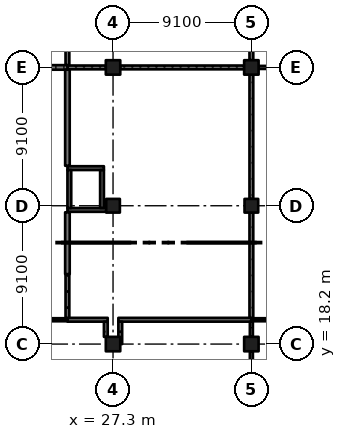
"""IFC4 building model, lengths in metres.
Left out: names, types, materials, properties, quantities, classifications, styles, units other than length and angle.
Written with IfcOpenShell. Run it as: python <this file> out.ifc"""

import sys

from ifc_helpers import new_model, si_unit, direction, frame, frame_2d, origin, origin_2d, place, context, subcontext, project, spatial, rectangle, extrude, element, fill, save


model = new_model("IFC4")
c1 = context("Model", 3, precision=1e-05, world=origin(), true_north=direction((0.0, 1.0)))
c2 = subcontext(c1, "Body", "Model", "MODEL_VIEW")
j1 = project(units=[si_unit("LENGTHUNIT", "METRE"), si_unit("PLANEANGLEUNIT", "RADIAN")], contexts=[c1])
p1 = place(None, origin())
s1 = spatial("IfcSite", under=j1, at=p1, CompositionType="ELEMENT")
p2 = place(p1, origin())
s2 = spatial("IfcBuilding", under=s1, at=p2, CompositionType="ELEMENT")
p3 = place(p2, origin())
s3 = spatial("IfcBuildingStorey", under=s2, at=p3, CompositionType="ELEMENT", Elevation=0.0)
p4 = place(p3, frame((27.3, 18.2, -0.4), z_axis=(0.0, 0.0, 1.0), x_axis=(1.0, 0.0, 0.0)))
e1 = element("IfcColumn", 1, at=p4, inside=s3, PredefinedType="COLUMN", context=c2, shape_type="SweptSolid", body=[
    extrude(rectangle(XDim=0.95, YDim=0.95, at=origin_2d()), origin(), (0.0, 0.0, 1.0), 6.77),
])
p5 = place(p3, frame((27.3, 27.3, -0.4), z_axis=(0.0, 0.0, 1.0), x_axis=(1.0, 0.0, 0.0)))
e2 = element("IfcColumn", 2, at=p5, inside=s3, PredefinedType="COLUMN", context=c2, shape_type="SweptSolid", body=[
    extrude(rectangle(XDim=0.9, YDim=0.9, at=origin_2d()), origin(), (0.0, 0.0, 1.0), 6.77),
])
for number, where, z_axis, x_axis in (
    (3, (27.3, 36.4, -0.4), (0.0, 0.0, 1.0), (1.0, 0.0, 0.0)),
    (4, (36.4, 18.2, -0.4), (0.0, 0.0, 1.0), (1.0, 0.0, 0.0)),
):
    element("IfcColumn", number, at=place(p3, frame(where, z_axis=z_axis, x_axis=x_axis)), inside=s3, PredefinedType="COLUMN", context=c2, shape_type="SweptSolid", body=[
        extrude(rectangle(XDim=0.95, YDim=0.95, at=origin_2d()), origin(), (0.0, 0.0, 1.0), 6.77),
    ])
p6 = place(p3, frame((36.4, 27.3, -0.4), z_axis=(0.0, 0.0, 1.0), x_axis=(1.0, 0.0, 0.0)))
e5 = element("IfcColumn", 5, at=p6, inside=s3, PredefinedType="COLUMN", context=c2, shape_type="SweptSolid", body=[
    extrude(rectangle(XDim=0.9, YDim=0.9, at=origin_2d()), origin(), (0.0, 0.0, 1.0), 6.77),
])
p7 = place(p3, frame((36.4, 36.4, -0.4), z_axis=(0.0, 0.0, 1.0), x_axis=(1.0, 0.0, 0.0)))
e6 = element("IfcColumn", 6, at=p7, inside=s3, PredefinedType="COLUMN", context=c2, shape_type="SweptSolid", body=[
    extrude(rectangle(XDim=0.95, YDim=0.95, at=origin_2d()), origin(), (0.0, 0.0, 1.0), 6.77),
])
p8 = place(p3, frame((26.85, 27.025, -0.4), z_axis=(0.0, 0.0, 1.0), x_axis=(-1.0, 0.0, 0.0)))
e7 = element("IfcWall", 7, at=p8, inside=s3, PredefinedType="SHEAR", context=c2, shape_type="SweptSolid", body=[
    extrude(rectangle(XDim=2.55, YDim=0.25, at=frame_2d((1.275, 0.0))), origin(), (0.0, 0.0, 1.0), 6.77),
])
p9 = place(p3, frame((26.7, 29.775, -0.4), z_axis=(0.0, 0.0, 1.0), x_axis=(-1.0, 0.0, 0.0)))
e8 = element("IfcWall", 8, at=p9, inside=s3, PredefinedType="SHEAR", context=c2, shape_type="SweptSolid", body=[
    extrude(rectangle(XDim=2.4, YDim=0.25, at=frame_2d((1.2, 0.0))), origin(), (0.0, 0.0, 1.0), 6.77),
])
p10 = place(p3, frame((24.425, 29.65, -0.4), z_axis=(0.0, 0.0, 1.0), x_axis=(0.0, -1.0, 0.0)))
e9 = element("IfcWall", 9, at=p10, inside=s3, PredefinedType="SHEAR", context=c2, shape_type="SweptSolid", body=[
    extrude(rectangle(XDim=2.5, YDim=0.25, at=frame_2d((1.25, 0.0))), origin(), (0.0, 0.0, 1.0), 6.77),
])
p11 = place(p10, frame((0.9, 0.0, 0.4)))
e10 = element("IfcOpeningElement", 10, at=p11, cuts=e9, PredefinedType="OPENING", context=c2, shape_type="SweptSolid", body=[
    extrude(rectangle(XDim=0.7, YDim=2.1, at=frame_2d((0.35, 1.05))), frame((0.0, 0.135, 0.0), z_axis=(0.0, -1.0, 0.0), x_axis=(1.0, 0.0, 0.0)), (0.0, 0.0, 1.0), 0.27),
])
p12 = place(p3, frame((26.575, 29.65, -0.4), z_axis=(0.0, 0.0, 1.0), x_axis=(0.0, -1.0, 0.0)))
e11 = element("IfcWall", 11, at=p12, inside=s3, PredefinedType="SHEAR", context=c2, shape_type="SweptSolid", body=[
    extrude(rectangle(XDim=2.5, YDim=0.25, at=frame_2d((1.25, 0.0))), origin(), (0.0, 0.0, 1.0), 6.77),
])
p13 = place(p3, frame((18.1, 19.8, 0.0), z_axis=(0.0, 0.0, 1.0), x_axis=(1.0, 0.0, 0.0)))
e12 = element("IfcWall", 12, at=p13, inside=s3, PredefinedType="PARTITIONING", context=c2, shape_type="SweptSolid", body=[
    extrude(rectangle(XDim=6.2, YDim=0.2, at=frame_2d((3.1, 0.0))), origin(), (0.0, 0.0, 1.0), 6.02),
])
p14 = place(p13, frame((2.95, 0.0, 0.0)))
e13 = element("IfcOpeningElement", 13, at=p14, cuts=e12, PredefinedType="OPENING", context=c2, shape_type="SweptSolid", body=[
    extrude(rectangle(XDim=1.8, YDim=2.4, at=frame_2d((0.9, 1.2))), frame((0.0, 0.11, 0.0), z_axis=(0.0, -1.0, 0.0), x_axis=(1.0, 0.0, 0.0)), (0.0, 0.0, 1.0), 0.22),
])
p15 = place(p3, frame((18.675, 36.4, 0.0), z_axis=(0.0, 0.0, 1.0), x_axis=(1.0, 0.0, 0.0)))
e14 = element("IfcWall", 14, at=p15, inside=s3, PredefinedType="SOLIDWALL", context=c2, shape_type="SweptSolid", body=[
    extrude(rectangle(XDim=5.625, YDim=0.3, at=frame_2d((2.812, 0.0))), origin(), (0.0, 0.0, 1.0), 5.32),
])
p16 = place(p15, frame((2.35, 0.0, 0.0)))
e15 = element("IfcOpeningElement", 15, at=p16, cuts=e14, PredefinedType="OPENING", context=c2, shape_type="SweptSolid", body=[
    extrude(rectangle(XDim=1.0, YDim=2.1, at=frame_2d((0.5, 1.05))), frame((0.0, 0.16, 0.0), z_axis=(0.0, -1.0, 0.0), x_axis=(1.0, 0.0, 0.0)), (0.0, 0.0, 1.0), 0.32),
])
p17 = place(p3, frame((24.3, 19.8, 0.0), z_axis=(0.0, 0.0, 1.0), x_axis=(1.0, 0.0, 0.0)))
e16 = element("IfcWall", 16, at=p17, inside=s3, PredefinedType="SOLIDWALL", context=c2, shape_type="SweptSolid", body=[
    extrude(rectangle(XDim=2.65, YDim=0.25, at=frame_2d((1.325, 0.0))), origin(), (0.0, 0.0, 1.0), 6.02),
])
p18 = place(p3, frame((24.3, 22.8, 0.0), z_axis=(0.0, 0.0, 1.0), x_axis=(0.0, -1.0, 0.0)))
e17 = element("IfcWall", 17, at=p18, inside=s3, PredefinedType="SOLIDWALL", context=c2, shape_type="SweptSolid", body=[
    extrude(rectangle(XDim=2.875, YDim=0.25, at=frame_2d((1.438, 0.0))), origin(), (0.0, 0.0, 1.0), 6.02),
])
p19 = place(p3, frame((24.3, 26.87, 0.0), z_axis=(0.0, 0.0, 1.0), x_axis=(0.0, -1.0, 0.0)))
e18 = element("IfcWall", 18, at=p19, inside=s3, PredefinedType="SOLIDWALL", context=c2, shape_type="SweptSolid", body=[
    extrude(rectangle(XDim=4.07, YDim=0.3, at=frame_2d((2.035, 0.0))), origin(), (0.0, 0.0, 1.0), 6.02),
])
p20 = place(p3, frame((24.3, 36.25, 0.0), z_axis=(0.0, 0.0, 1.0), x_axis=(0.0, -1.0, 0.0)))
e19 = element("IfcWall", 19, at=p20, inside=s3, PredefinedType="SOLIDWALL", context=c2, shape_type="SweptSolid", body=[
    extrude(rectangle(XDim=6.32, YDim=0.3, at=frame_2d((3.16, 0.0))), origin(), (0.0, 0.0, 1.0), 6.02),
])
p21 = place(p3, frame((24.3, 36.4, 0.0), z_axis=(0.0, 0.0, 1.0), x_axis=(1.0, 0.0, 0.0)))
e20 = element("IfcWall", 20, at=p21, inside=s3, PredefinedType="SOLIDWALL", context=c2, shape_type="SweptSolid", body=[
    extrude(rectangle(XDim=2.525, YDim=0.25, at=frame_2d((1.262, 0.0))), origin(), (0.0, 0.0, 1.0), 5.32),
])
p22 = place(p3, frame((24.3, 40.55, 0.0), z_axis=(0.0, 0.0, 1.0), x_axis=(0.0, -1.0, 0.0)))
e21 = element("IfcWall", 21, at=p22, inside=s3, PredefinedType="SOLIDWALL", context=c2, shape_type="SweptSolid", body=[
    extrude(rectangle(XDim=4.0, YDim=0.25, at=frame_2d((2.0, 0.0))), origin(), (0.0, 0.0, 1.0), 6.02),
])
p23 = place(p3, frame((26.825, 19.675, 0.0), z_axis=(0.0, 0.0, 1.0), x_axis=(0.0, -1.0, 0.0)))
e22 = element("IfcWall", 22, at=p23, inside=s3, PredefinedType="SOLIDWALL", context=c2, shape_type="SweptSolid", body=[
    extrude(rectangle(XDim=1.0, YDim=0.25, at=frame_2d((0.5, 0.0))), origin(), (0.0, 0.0, 1.0), 6.02),
])
p24 = place(p3, frame((27.65, 19.8, 0.0), z_axis=(0.0, 0.0, 1.0), x_axis=(1.0, 0.0, 0.0)))
e23 = element("IfcWall", 23, at=p24, inside=s3, PredefinedType="SOLIDWALL", context=c2, shape_type="SweptSolid", body=[
    extrude(rectangle(XDim=8.75, YDim=0.25, at=frame_2d((4.375, 0.0))), origin(), (0.0, 0.0, 1.0), 6.02),
])
p25 = place(p24, frame((3.45, 0.0, 0.0)))
e24 = element("IfcOpeningElement", 24, at=p25, cuts=e23, PredefinedType="OPENING", context=c2, shape_type="SweptSolid", body=[
    extrude(rectangle(XDim=1.8, YDim=2.1, at=frame_2d((0.9, 1.05))), frame((0.0, 0.135, 0.0), z_axis=(0.0, -1.0, 0.0), x_axis=(1.0, 0.0, 0.0)), (0.0, 0.0, 1.0), 0.27),
])
p26 = place(p3, frame((27.775, 18.2, 0.0), z_axis=(0.0, 0.0, 1.0), x_axis=(0.0, 1.0, 0.0)))
e25 = element("IfcWall", 25, at=p26, inside=s3, PredefinedType="SOLIDWALL", context=c2, shape_type="SweptSolid", body=[
    extrude(rectangle(XDim=1.475, YDim=0.25, at=frame_2d((0.738, 0.0))), origin(), (0.0, 0.0, 1.0), 6.02),
])
p27 = place(p3, frame((27.775, 36.4, 0.0), z_axis=(0.0, 0.0, 1.0), x_axis=(1.0, 0.0, 0.0)))
e26 = element("IfcWall", 26, at=p27, inside=s3, PredefinedType="SOLIDWALL", context=c2, shape_type="SweptSolid", body=[
    extrude(rectangle(XDim=8.15, YDim=0.25, at=frame_2d((4.075, 0.0))), origin(), (0.0, 0.0, 1.0), 5.32),
])
p28 = place(p3, frame((36.4, 17.725, 0.0), z_axis=(0.0, 0.0, 1.0), x_axis=(0.0, -1.0, 0.0)))
e27 = element("IfcWall", 27, at=p28, inside=s3, PredefinedType="PARTITIONING", context=c2, shape_type="SweptSolid", body=[
    extrude(rectangle(XDim=6.825, YDim=0.2, at=frame_2d((3.413, 0.0))), origin(), (0.0, 0.0, 1.0), 5.32),
])
p29 = place(p28, frame((0.85, 0.0, 0.0)))
e28 = element("IfcOpeningElement", 28, at=p29, cuts=e27, PredefinedType="OPENING", context=c2, shape_type="SweptSolid", body=[
    extrude(rectangle(XDim=1.8, YDim=2.4, at=frame_2d((0.9, 1.2))), frame((0.0, 0.11, 0.0), z_axis=(0.0, -1.0, 0.0), x_axis=(1.0, 0.0, 0.0)), (0.0, 0.0, 1.0), 0.22),
])
p30 = place(p28, frame((4.25, 0.0, 0.0)))
e29 = element("IfcOpeningElement", 29, at=p30, cuts=e27, PredefinedType="OPENING", context=c2, shape_type="SweptSolid", body=[
    extrude(rectangle(XDim=1.8, YDim=2.4, at=frame_2d((0.9, 1.2))), frame((0.0, 0.11, 0.0), z_axis=(0.0, -1.0, 0.0), x_axis=(1.0, 0.0, 0.0)), (0.0, 0.0, 1.0), 0.22),
])
p31 = place(p3, frame((36.4, 19.675, 0.0), z_axis=(0.0, 0.0, 1.0), x_axis=(0.0, -1.0, 0.0)))
e30 = element("IfcWall", 30, at=p31, inside=s3, PredefinedType="PARTITIONING", context=c2, shape_type="SweptSolid", body=[
    extrude(rectangle(XDim=1.0, YDim=0.2, at=frame_2d((0.5, 0.0))), origin(), (0.0, 0.0, 1.0), 5.32),
])
p32 = place(p3, frame((36.4, 19.8, 0.0), z_axis=(0.0, 0.0, 1.0), x_axis=(1.0, 0.0, 0.0)))
e31 = element("IfcWall", 31, at=p32, inside=s3, PredefinedType="PARTITIONING", context=c2, shape_type="SweptSolid", body=[
    extrude(rectangle(XDim=4.15, YDim=0.2, at=frame_2d((2.075, 0.0))), origin(), (0.0, 0.0, 1.0), 6.02),
])
p33 = place(p32, frame((1.15, 0.0, 0.0)))
e32 = element("IfcOpeningElement", 32, at=p33, cuts=e31, PredefinedType="OPENING", context=c2, shape_type="SweptSolid", body=[
    extrude(rectangle(XDim=1.8, YDim=2.4, at=frame_2d((0.9, 1.2))), frame((0.0, 0.11, 0.0), z_axis=(0.0, -1.0, 0.0), x_axis=(1.0, 0.0, 0.0)), (0.0, 0.0, 1.0), 0.22),
])
p34 = place(p3, frame((36.4, 26.85, 0.0), z_axis=(0.0, 0.0, 1.0), x_axis=(0.0, -1.0, 0.0)))
e33 = element("IfcWall", 33, at=p34, inside=s3, PredefinedType="SOLIDWALL", context=c2, shape_type="SweptSolid", body=[
    extrude(rectangle(XDim=6.925, YDim=0.25, at=frame_2d((3.462, 0.0))), origin(), (0.0, 0.0, 1.0), 5.32),
])
p35 = place(p3, frame((36.4, 35.925, 0.0), z_axis=(0.0, 0.0, 1.0), x_axis=(0.0, -1.0, 0.0)))
e34 = element("IfcWall", 34, at=p35, inside=s3, PredefinedType="SOLIDWALL", context=c2, shape_type="SweptSolid", body=[
    extrude(rectangle(XDim=8.175, YDim=0.25, at=frame_2d((4.087, 0.0))), origin(), (0.0, 0.0, 1.0), 5.32),
])
p36 = place(p3, frame((36.4, 40.55, 0.0), z_axis=(0.0, 0.0, 1.0), x_axis=(0.0, -1.0, 0.0)))
e35 = element("IfcWall", 35, at=p36, inside=s3, PredefinedType="SOLIDWALL", context=c2, shape_type="SweptSolid", body=[
    extrude(rectangle(XDim=3.675, YDim=0.25, at=frame_2d((1.837, 0.0))), origin(), (0.0, 0.0, 1.0), 6.02),
])
p37 = place(p36, frame((1.35, 0.0, 0.0)))
e36 = element("IfcOpeningElement", 36, at=p37, cuts=e35, PredefinedType="OPENING", context=c2, shape_type="SweptSolid", body=[
    extrude(rectangle(XDim=1.0, YDim=2.1, at=frame_2d((0.5, 1.05))), frame((0.0, 0.135, 0.0), z_axis=(0.0, -1.0, 0.0), x_axis=(1.0, 0.0, 0.0)), (0.0, 0.0, 1.0), 0.27),
])
p38 = place(p3, frame((36.875, 36.4, 0.0), z_axis=(0.0, 0.0, 1.0), x_axis=(1.0, 0.0, 0.0)))
e37 = element("IfcWall", 37, at=p38, inside=s3, PredefinedType="PARTITIONING", context=c2, shape_type="SweptSolid", body=[
    extrude(rectangle(XDim=3.675, YDim=0.2, at=frame_2d((1.837, 0.0))), origin(), (0.0, 0.0, 1.0), 6.02),
])
p39 = place(p38, frame((0.65, 0.0, 0.0)))
e38 = element("IfcOpeningElement", 38, at=p39, cuts=e37, PredefinedType="OPENING", context=c2, shape_type="SweptSolid", body=[
    extrude(rectangle(XDim=2.4, YDim=2.4, at=frame_2d((1.2, 1.2))), frame((0.0, 0.11, 0.0), z_axis=(0.0, -1.0, 0.0), x_axis=(1.0, 0.0, 0.0)), (0.0, 0.0, 1.0), 0.22),
])
p40 = place(p25, origin())
e39 = element("IfcDoor", 39, at=p40, inside=s3, OperationType="DOUBLE_DOOR_SINGLE_SWING", PredefinedType="DOOR", context=c2, shape_type="SweptSolid", body=[
    extrude(rectangle(XDim=1.8, YDim=2.1, at=frame_2d((0.9, 1.05))), frame((0.0, 0.025, 0.0), z_axis=(0.0, -1.0, 0.0), x_axis=(1.0, 0.0, 0.0)), (0.0, 0.0, 1.0), 0.05),
])
fill(e24, e39)
p41 = place(p11, origin())
e40 = element("IfcDoor", 40, at=p41, inside=s3, OperationType="SINGLE_SWING_LEFT", PredefinedType="DOOR", context=c2, shape_type="SweptSolid", body=[
    extrude(rectangle(XDim=0.7, YDim=2.1, at=frame_2d((0.35, 1.05))), frame((0.0, 0.025, 0.0), z_axis=(0.0, -1.0, 0.0), x_axis=(1.0, 0.0, 0.0)), (0.0, 0.0, 1.0), 0.05),
])
fill(e10, e40)
save(model, sys.argv[1])
